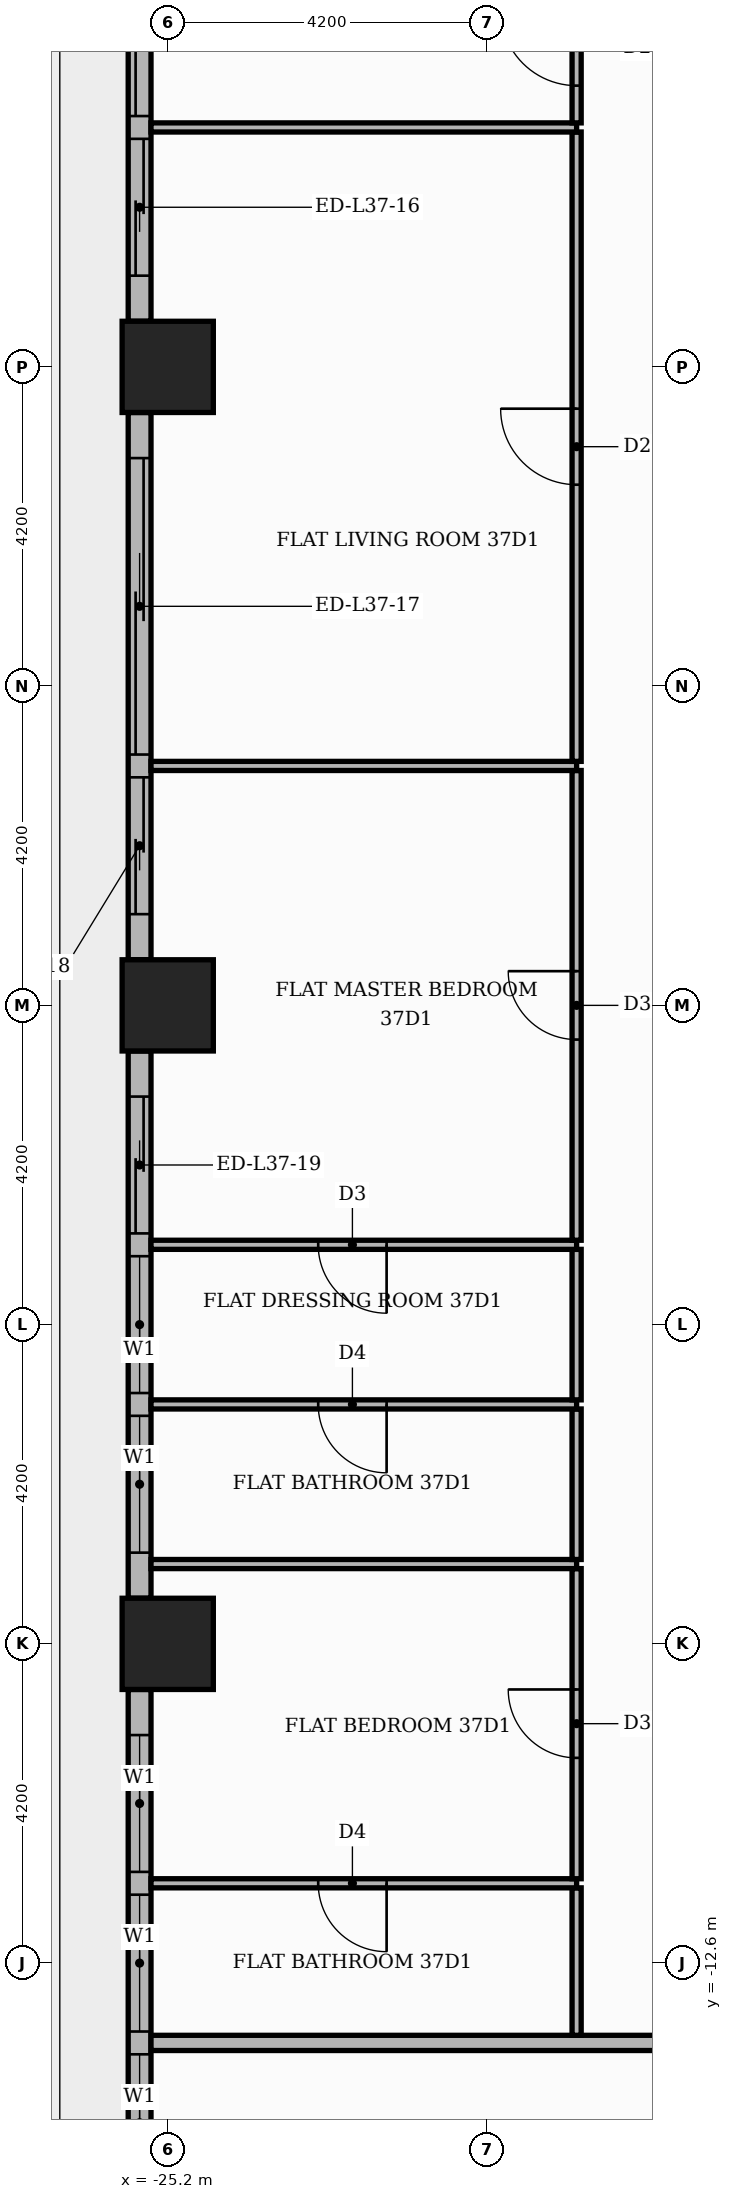
"""IFC4 building model, lengths in metres.
Left out: names, types, materials, properties, quantities, classifications, styles, units other than length and angle.
Written with IfcOpenShell. Run it as: python <this file> out.ifc"""

import sys

from ifc_helpers import new_model, si_unit, direction, frame, frame_2d, origin, origin_2d, place, context, subcontext, project, spatial, rectangle, extrude, element, fill, save


model = new_model("IFC4")
c1 = context("Model", 3, precision=1e-05, world=origin(), true_north=direction((0.0, 1.0)))
c2 = subcontext(c1, "Body", "Model", "MODEL_VIEW")
j1 = project(units=[si_unit("LENGTHUNIT", "METRE"), si_unit("PLANEANGLEUNIT", "RADIAN")], contexts=[c1])
p1 = place(None, origin())
s1 = spatial("IfcSite", under=j1, at=p1, CompositionType="ELEMENT")
p2 = place(p1, origin())
s2 = spatial("IfcBuilding", under=s1, at=p2, CompositionType="ELEMENT")
p3 = place(p2, frame((0.0, 0.0, 157.2)))
s3 = spatial("IfcBuildingStorey", under=s2, at=p3, CompositionType="ELEMENT", Elevation=157.2)
for number, where, z_axis, x_axis in (
    (1, (-25.2, 0.0, 0.0), (0.0, 0.0, 1.0), (1.0, 0.0, 0.0)),
    (2, (-25.2, -8.4, 0.0), (0.0, 0.0, 1.0), (1.0, 0.0, 0.0)),
    (3, (-25.2, 8.4, 0.0), (0.0, 0.0, 1.0), (1.0, 0.0, 0.0)),
):
    element("IfcColumn", number, at=place(p3, frame(where, z_axis=z_axis, x_axis=x_axis)), inside=s3, PredefinedType="COLUMN", context=c2, shape_type="SweptSolid", body=[
        extrude(rectangle(XDim=1.2, YDim=1.2, at=origin_2d()), origin(), (0.0, 0.0, 1.0), 3.9),
    ])
p4 = place(p3, frame((-25.57, 16.2, 0.0), z_axis=(0.0, 0.0, 1.0), x_axis=(0.0, -1.0, 0.0)))
e4 = element("IfcWall", 4, at=p4, inside=s3, PredefinedType="STANDARD", context=c2, shape_type="SweptSolid", body=[
    extrude(rectangle(XDim=7.2, YDim=0.3, at=frame_2d((3.6, 0.0))), origin(), (0.0, 0.0, 1.0), 3.48),
])
p5 = place(p4, frame((0.6, 0.0, 0.0)))
e5 = element("IfcOpeningElement", 5, at=p5, cuts=e4, PredefinedType="OPENING", context=c2, shape_type="SweptSolid", body=[
    extrude(rectangle(XDim=3.9, YDim=2.4, at=frame_2d((1.95, 1.2))), frame((0.0, 0.16, 0.0), z_axis=(0.0, -1.0, 0.0), x_axis=(1.0, 0.0, 0.0)), (0.0, 0.0, 1.0), 0.32),
])
p6 = place(p4, frame((4.8, 0.0, 0.0)))
e6 = element("IfcOpeningElement", 6, at=p6, cuts=e4, PredefinedType="OPENING", context=c2, shape_type="SweptSolid", body=[
    extrude(rectangle(XDim=1.8, YDim=2.4, at=frame_2d((0.9, 1.2))), frame((0.0, 0.16, 0.0), z_axis=(0.0, -1.0, 0.0), x_axis=(1.0, 0.0, 0.0)), (0.0, 0.0, 1.0), 0.32),
])
p7 = place(p3, frame((-25.57, 7.8, 0.0), z_axis=(0.0, 0.0, 1.0), x_axis=(0.0, -1.0, 0.0)))
e7 = element("IfcWall", 7, at=p7, inside=s3, PredefinedType="STANDARD", context=c2, shape_type="SweptSolid", body=[
    extrude(rectangle(XDim=7.2, YDim=0.3, at=frame_2d((3.6, 0.0))), origin(), (0.0, 0.0, 1.0), 3.48),
])
p8 = place(p7, frame((0.6, 0.0, 0.0)))
e8 = element("IfcOpeningElement", 8, at=p8, cuts=e7, PredefinedType="OPENING", context=c2, shape_type="SweptSolid", body=[
    extrude(rectangle(XDim=3.9, YDim=2.4, at=frame_2d((1.95, 1.2))), frame((0.0, 0.16, 0.0), z_axis=(0.0, -1.0, 0.0), x_axis=(1.0, 0.0, 0.0)), (0.0, 0.0, 1.0), 0.32),
])
p9 = place(p7, frame((4.8, 0.0, 0.0)))
e9 = element("IfcOpeningElement", 9, at=p9, cuts=e7, PredefinedType="OPENING", context=c2, shape_type="SweptSolid", body=[
    extrude(rectangle(XDim=1.8, YDim=2.4, at=frame_2d((0.9, 1.2))), frame((0.0, 0.16, 0.0), z_axis=(0.0, -1.0, 0.0), x_axis=(1.0, 0.0, 0.0)), (0.0, 0.0, 1.0), 0.32),
])
p10 = place(p3, frame((-25.57, -0.6, 0.0), z_axis=(0.0, 0.0, 1.0), x_axis=(0.0, -1.0, 0.0)))
e10 = element("IfcWall", 10, at=p10, inside=s3, PredefinedType="STANDARD", context=c2, shape_type="SweptSolid", body=[
    extrude(rectangle(XDim=7.2, YDim=0.3, at=frame_2d((3.6, 0.0))), origin(), (0.0, 0.0, 1.0), 3.48),
])
p11 = place(p10, frame((0.6, 0.0, 0.0)))
e11 = element("IfcOpeningElement", 11, at=p11, cuts=e10, PredefinedType="OPENING", context=c2, shape_type="SweptSolid", body=[
    extrude(rectangle(XDim=1.8, YDim=2.4, at=frame_2d((0.9, 1.2))), frame((0.0, 0.16, 0.0), z_axis=(0.0, -1.0, 0.0), x_axis=(1.0, 0.0, 0.0)), (0.0, 0.0, 1.0), 0.32),
])
p12 = place(p10, frame((2.7, 0.0, 0.9)))
e12 = element("IfcOpeningElement", 12, at=p12, cuts=e10, PredefinedType="OPENING", context=c2, shape_type="SweptSolid", body=[
    extrude(rectangle(XDim=1.8, YDim=2.1, at=frame_2d((0.9, 1.05))), frame((0.0, 0.16, 0.0), z_axis=(0.0, -1.0, 0.0), x_axis=(1.0, 0.0, 0.0)), (0.0, 0.0, 1.0), 0.32),
])
p13 = place(p10, frame((4.8, 0.0, 0.9)))
e13 = element("IfcOpeningElement", 13, at=p13, cuts=e10, PredefinedType="OPENING", context=c2, shape_type="SweptSolid", body=[
    extrude(rectangle(XDim=1.8, YDim=2.1, at=frame_2d((0.9, 1.05))), frame((0.0, 0.16, 0.0), z_axis=(0.0, -1.0, 0.0), x_axis=(1.0, 0.0, 0.0)), (0.0, 0.0, 1.0), 0.32),
])
p14 = place(p3, frame((-25.57, -9.0, 0.0), z_axis=(0.0, 0.0, 1.0), x_axis=(0.0, -1.0, 0.0)))
e14 = element("IfcWall", 14, at=p14, inside=s3, PredefinedType="STANDARD", context=c2, shape_type="SweptSolid", body=[
    extrude(rectangle(XDim=7.2, YDim=0.3, at=frame_2d((3.6, 0.0))), origin(), (0.0, 0.0, 1.0), 3.48),
])
p15 = place(p14, frame((0.6, 0.0, 0.9)))
e15 = element("IfcOpeningElement", 15, at=p15, cuts=e14, PredefinedType="OPENING", context=c2, shape_type="SweptSolid", body=[
    extrude(rectangle(XDim=1.8, YDim=2.1, at=frame_2d((0.9, 1.05))), frame((0.0, 0.16, 0.0), z_axis=(0.0, -1.0, 0.0), x_axis=(1.0, 0.0, 0.0)), (0.0, 0.0, 1.0), 0.32),
])
p16 = place(p14, frame((2.7, 0.0, 0.9)))
e16 = element("IfcOpeningElement", 16, at=p16, cuts=e14, PredefinedType="OPENING", context=c2, shape_type="SweptSolid", body=[
    extrude(rectangle(XDim=1.8, YDim=2.1, at=frame_2d((0.9, 1.05))), frame((0.0, 0.16, 0.0), z_axis=(0.0, -1.0, 0.0), x_axis=(1.0, 0.0, 0.0)), (0.0, 0.0, 1.0), 0.32),
])
p17 = place(p14, frame((4.8, 0.0, 0.9)))
e17 = element("IfcOpeningElement", 17, at=p17, cuts=e14, PredefinedType="OPENING", context=c2, shape_type="SweptSolid", body=[
    extrude(rectangle(XDim=1.8, YDim=2.1, at=frame_2d((0.9, 1.05))), frame((0.0, 0.16, 0.0), z_axis=(0.0, -1.0, 0.0), x_axis=(1.0, 0.0, 0.0)), (0.0, 0.0, 1.0), 0.32),
])
p18 = place(p3, frame((-25.42, -13.65, 0.0), z_axis=(0.0, 0.0, 1.0), x_axis=(1.0, 0.0, 0.0)))
e18 = element("IfcWall", 18, at=p18, inside=s3, PredefinedType="PARTITIONING", context=c2, shape_type="SweptSolid", body=[
    extrude(rectangle(XDim=39.07, YDim=0.2, at=frame_2d((19.535, 0.0))), origin(), (0.0, 0.0, 1.0), 3.48),
])
p19 = place(p18, frame((13.32, 0.0, 0.0)))
e19 = element("IfcOpeningElement", 19, at=p19, cuts=e18, PredefinedType="OPENING", context=c2, shape_type="SweptSolid", body=[
    extrude(rectangle(XDim=1.1, YDim=2.4, at=frame_2d((0.55, 1.2))), frame((0.0, 0.11, 0.0), z_axis=(0.0, -1.0, 0.0), x_axis=(1.0, 0.0, 0.0)), (0.0, 0.0, 1.0), 0.22),
])
p20 = place(p18, frame((21.72, 0.0, 0.0)))
e20 = element("IfcOpeningElement", 20, at=p20, cuts=e18, PredefinedType="OPENING", context=c2, shape_type="SweptSolid", body=[
    extrude(rectangle(XDim=1.1, YDim=2.4, at=frame_2d((0.55, 1.2))), frame((0.0, 0.11, 0.0), z_axis=(0.0, -1.0, 0.0), x_axis=(1.0, 0.0, 0.0)), (0.0, 0.0, 1.0), 0.22),
])
p21 = place(p3, frame((-19.82, -13.55, 0.0), z_axis=(0.0, 0.0, 1.0), x_axis=(0.0, 1.0, 0.0)))
e21 = element("IfcWall", 21, at=p21, inside=s3, PredefinedType="PARTITIONING", context=c2, shape_type="SweptSolid", body=[
    extrude(rectangle(XDim=1.94, YDim=0.12, at=frame_2d((0.97, 0.0))), origin(), (0.0, 0.0, 1.0), 3.48),
])
p22 = place(p3, frame((-25.42, -11.55, 0.0), z_axis=(0.0, 0.0, 1.0), x_axis=(1.0, 0.0, 0.0)))
e22 = element("IfcWall", 22, at=p22, inside=s3, PredefinedType="PARTITIONING", context=c2, shape_type="SweptSolid", body=[
    extrude(rectangle(XDim=5.6, YDim=0.12, at=frame_2d((2.8, 0.0))), origin(), (0.0, 0.0, 1.0), 3.48),
])
p23 = place(p22, frame((2.2, 0.0, 0.0)))
e23 = element("IfcOpeningElement", 23, at=p23, cuts=e22, PredefinedType="OPENING", context=c2, shape_type="SweptSolid", body=[
    extrude(rectangle(XDim=0.9, YDim=2.1, at=frame_2d((0.45, 1.05))), frame((0.0, 0.07, 0.0), z_axis=(0.0, -1.0, 0.0), x_axis=(1.0, 0.0, 0.0)), (0.0, 0.0, 1.0), 0.14),
])
p24 = place(p3, frame((-19.82, -11.49, 0.0), z_axis=(0.0, 0.0, 1.0), x_axis=(0.0, 1.0, 0.0)))
e24 = element("IfcWall", 24, at=p24, inside=s3, PredefinedType="PARTITIONING", context=c2, shape_type="SweptSolid", body=[
    extrude(rectangle(XDim=4.08, YDim=0.12, at=frame_2d((2.04, 0.0))), origin(), (0.0, 0.0, 1.0), 3.48),
])
p25 = place(p24, frame((1.59, 0.0, 0.0)))
e25 = element("IfcOpeningElement", 25, at=p25, cuts=e24, PredefinedType="OPENING", context=c2, shape_type="SweptSolid", body=[
    extrude(rectangle(XDim=0.9, YDim=2.1, at=frame_2d((0.45, 1.05))), frame((0.0, 0.07, 0.0), z_axis=(0.0, -1.0, 0.0), x_axis=(1.0, 0.0, 0.0)), (0.0, 0.0, 1.0), 0.14),
])
p26 = place(p3, frame((-25.42, -7.35, 0.0), z_axis=(0.0, 0.0, 1.0), x_axis=(1.0, 0.0, 0.0)))
e26 = element("IfcWall", 26, at=p26, inside=s3, PredefinedType="PARTITIONING", context=c2, shape_type="SweptSolid", body=[
    extrude(rectangle(XDim=5.6, YDim=0.12, at=frame_2d((2.8, 0.0))), origin(), (0.0, 0.0, 1.0), 3.48),
])
p27 = place(p3, frame((-19.82, -7.29, 0.0), z_axis=(0.0, 0.0, 1.0), x_axis=(0.0, 1.0, 0.0)))
e27 = element("IfcWall", 27, at=p27, inside=s3, PredefinedType="PARTITIONING", context=c2, shape_type="SweptSolid", body=[
    extrude(rectangle(XDim=1.98, YDim=0.12, at=frame_2d((0.99, 0.0))), origin(), (0.0, 0.0, 1.0), 3.48),
])
p28 = place(p3, frame((-25.42, -5.25, 0.0), z_axis=(0.0, 0.0, 1.0), x_axis=(1.0, 0.0, 0.0)))
e28 = element("IfcWall", 28, at=p28, inside=s3, PredefinedType="PARTITIONING", context=c2, shape_type="SweptSolid", body=[
    extrude(rectangle(XDim=5.6, YDim=0.12, at=frame_2d((2.8, 0.0))), origin(), (0.0, 0.0, 1.0), 3.48),
])
p29 = place(p28, frame((2.2, 0.0, 0.0)))
e29 = element("IfcOpeningElement", 29, at=p29, cuts=e28, PredefinedType="OPENING", context=c2, shape_type="SweptSolid", body=[
    extrude(rectangle(XDim=0.9, YDim=2.1, at=frame_2d((0.45, 1.05))), frame((0.0, 0.07, 0.0), z_axis=(0.0, -1.0, 0.0), x_axis=(1.0, 0.0, 0.0)), (0.0, 0.0, 1.0), 0.14),
])
p30 = place(p3, frame((-19.82, -5.19, 0.0), z_axis=(0.0, 0.0, 1.0), x_axis=(0.0, 1.0, 0.0)))
e30 = element("IfcWall", 30, at=p30, inside=s3, PredefinedType="PARTITIONING", context=c2, shape_type="SweptSolid", body=[
    extrude(rectangle(XDim=1.98, YDim=0.12, at=frame_2d((0.99, 0.0))), origin(), (0.0, 0.0, 1.0), 3.48),
])
p31 = place(p3, frame((-25.42, -3.15, 0.0), z_axis=(0.0, 0.0, 1.0), x_axis=(1.0, 0.0, 0.0)))
e31 = element("IfcWall", 31, at=p31, inside=s3, PredefinedType="PARTITIONING", context=c2, shape_type="SweptSolid", body=[
    extrude(rectangle(XDim=5.6, YDim=0.12, at=frame_2d((2.8, 0.0))), origin(), (0.0, 0.0, 1.0), 3.48),
])
p32 = place(p31, frame((2.2, 0.0, 0.0)))
e32 = element("IfcOpeningElement", 32, at=p32, cuts=e31, PredefinedType="OPENING", context=c2, shape_type="SweptSolid", body=[
    extrude(rectangle(XDim=0.9, YDim=2.1, at=frame_2d((0.45, 1.05))), frame((0.0, 0.07, 0.0), z_axis=(0.0, -1.0, 0.0), x_axis=(1.0, 0.0, 0.0)), (0.0, 0.0, 1.0), 0.14),
])
p33 = place(p3, frame((-19.82, -3.09, 0.0), z_axis=(0.0, 0.0, 1.0), x_axis=(0.0, 1.0, 0.0)))
e33 = element("IfcWall", 33, at=p33, inside=s3, PredefinedType="PARTITIONING", context=c2, shape_type="SweptSolid", body=[
    extrude(rectangle(XDim=6.18, YDim=0.12, at=frame_2d((3.09, 0.0))), origin(), (0.0, 0.0, 1.0), 3.48),
])
p34 = place(p33, frame((2.64, 0.0, 0.0)))
e34 = element("IfcOpeningElement", 34, at=p34, cuts=e33, PredefinedType="OPENING", context=c2, shape_type="SweptSolid", body=[
    extrude(rectangle(XDim=0.9, YDim=2.1, at=frame_2d((0.45, 1.05))), frame((0.0, 0.07, 0.0), z_axis=(0.0, -1.0, 0.0), x_axis=(1.0, 0.0, 0.0)), (0.0, 0.0, 1.0), 0.14),
])
p35 = place(p3, frame((-25.42, 3.15, 0.0), z_axis=(0.0, 0.0, 1.0), x_axis=(1.0, 0.0, 0.0)))
e35 = element("IfcWall", 35, at=p35, inside=s3, PredefinedType="PARTITIONING", context=c2, shape_type="SweptSolid", body=[
    extrude(rectangle(XDim=5.6, YDim=0.12, at=frame_2d((2.8, 0.0))), origin(), (0.0, 0.0, 1.0), 3.48),
])
p36 = place(p3, frame((-19.82, 3.21, 0.0), z_axis=(0.0, 0.0, 1.0), x_axis=(0.0, 1.0, 0.0)))
e36 = element("IfcWall", 36, at=p36, inside=s3, PredefinedType="PARTITIONING", context=c2, shape_type="SweptSolid", body=[
    extrude(rectangle(XDim=8.28, YDim=0.12, at=frame_2d((4.14, 0.0))), origin(), (0.0, 0.0, 1.0), 3.48),
])
p37 = place(p36, frame((3.64, 0.0, 0.0)))
e37 = element("IfcOpeningElement", 37, at=p37, cuts=e36, PredefinedType="OPENING", context=c2, shape_type="SweptSolid", body=[
    extrude(rectangle(XDim=1.0, YDim=2.1, at=frame_2d((0.5, 1.05))), frame((0.0, 0.07, 0.0), z_axis=(0.0, -1.0, 0.0), x_axis=(1.0, 0.0, 0.0)), (0.0, 0.0, 1.0), 0.14),
])
p38 = place(p3, frame((-25.42, 11.55, 0.0), z_axis=(0.0, 0.0, 1.0), x_axis=(1.0, 0.0, 0.0)))
e38 = element("IfcWall", 38, at=p38, inside=s3, PredefinedType="PARTITIONING", context=c2, shape_type="SweptSolid", body=[
    extrude(rectangle(XDim=5.6, YDim=0.12, at=frame_2d((2.8, 0.0))), origin(), (0.0, 0.0, 1.0), 3.48),
])
p39 = place(p3, frame((-19.82, 11.61, 0.0), z_axis=(0.0, 0.0, 1.0), x_axis=(0.0, 1.0, 0.0)))
e39 = element("IfcWall", 39, at=p39, inside=s3, PredefinedType="PARTITIONING", context=c2, shape_type="SweptSolid", body=[
    extrude(rectangle(XDim=1.98, YDim=0.12, at=frame_2d((0.99, 0.0))), origin(), (0.0, 0.0, 1.0), 3.48),
])
p40 = place(p39, frame((0.49, 0.0, 0.0)))
e40 = element("IfcOpeningElement", 40, at=p40, cuts=e39, PredefinedType="OPENING", context=c2, shape_type="SweptSolid", body=[
    extrude(rectangle(XDim=1.0, YDim=2.1, at=frame_2d((0.5, 1.05))), frame((0.0, 0.07, 0.0), z_axis=(0.0, -1.0, 0.0), x_axis=(1.0, 0.0, 0.0)), (0.0, 0.0, 1.0), 0.14),
])
p41 = place(p5, origin())
e41 = element("IfcDoor", 41, at=p41, inside=s3, OperationType="SLIDING_TO_LEFT", PredefinedType="DOOR", context=c2, shape_type="SweptSolid", body=[
    extrude(rectangle(XDim=3.9, YDim=2.4, at=frame_2d((1.95, 1.2))), frame((0.0, 0.025, 0.0), z_axis=(0.0, -1.0, 0.0), x_axis=(1.0, 0.0, 0.0)), (0.0, 0.0, 1.0), 0.05),
])
fill(e5, e41)
p42 = place(p6, origin())
e42 = element("IfcDoor", 42, at=p42, inside=s3, OperationType="SLIDING_TO_RIGHT", PredefinedType="DOOR", context=c2, shape_type="SweptSolid", body=[
    extrude(rectangle(XDim=1.8, YDim=2.4, at=frame_2d((0.9, 1.2))), frame((0.0, 0.025, 0.0), z_axis=(0.0, -1.0, 0.0), x_axis=(1.0, 0.0, 0.0)), (0.0, 0.0, 1.0), 0.05),
])
fill(e6, e42)
p43 = place(p8, origin())
e43 = element("IfcDoor", 43, at=p43, inside=s3, OperationType="SLIDING_TO_LEFT", PredefinedType="DOOR", context=c2, shape_type="SweptSolid", body=[
    extrude(rectangle(XDim=3.9, YDim=2.4, at=frame_2d((1.95, 1.2))), frame((0.0, 0.025, 0.0), z_axis=(0.0, -1.0, 0.0), x_axis=(1.0, 0.0, 0.0)), (0.0, 0.0, 1.0), 0.05),
])
fill(e8, e43)
p44 = place(p9, origin())
e44 = element("IfcDoor", 44, at=p44, inside=s3, OperationType="SLIDING_TO_RIGHT", PredefinedType="DOOR", context=c2, shape_type="SweptSolid", body=[
    extrude(rectangle(XDim=1.8, YDim=2.4, at=frame_2d((0.9, 1.2))), frame((0.0, 0.025, 0.0), z_axis=(0.0, -1.0, 0.0), x_axis=(1.0, 0.0, 0.0)), (0.0, 0.0, 1.0), 0.05),
])
fill(e9, e44)
p45 = place(p11, origin())
e45 = element("IfcDoor", 45, at=p45, inside=s3, OperationType="SLIDING_TO_LEFT", PredefinedType="DOOR", context=c2, shape_type="SweptSolid", body=[
    extrude(rectangle(XDim=1.8, YDim=2.4, at=frame_2d((0.9, 1.2))), frame((0.0, 0.025, 0.0), z_axis=(0.0, -1.0, 0.0), x_axis=(1.0, 0.0, 0.0)), (0.0, 0.0, 1.0), 0.05),
])
fill(e11, e45)
p46 = place(p12, origin())
e46 = element("IfcWindow", 46, at=p46, inside=s3, PartitioningType="SINGLE_PANEL", PredefinedType="WINDOW", context=c2, shape_type="SweptSolid", body=[
    extrude(rectangle(XDim=1.8, YDim=2.1, at=frame_2d((0.9, 1.05))), frame((0.0, 0.03, 0.0), z_axis=(0.0, -1.0, 0.0), x_axis=(1.0, 0.0, 0.0)), (0.0, 0.0, 1.0), 0.06),
])
fill(e12, e46)
p47 = place(p13, origin())
e47 = element("IfcWindow", 47, at=p47, inside=s3, PartitioningType="SINGLE_PANEL", PredefinedType="WINDOW", context=c2, shape_type="SweptSolid", body=[
    extrude(rectangle(XDim=1.8, YDim=2.1, at=frame_2d((0.9, 1.05))), frame((0.0, 0.03, 0.0), z_axis=(0.0, -1.0, 0.0), x_axis=(1.0, 0.0, 0.0)), (0.0, 0.0, 1.0), 0.06),
])
fill(e13, e47)
p48 = place(p15, origin())
e48 = element("IfcWindow", 48, at=p48, inside=s3, PartitioningType="SINGLE_PANEL", PredefinedType="WINDOW", context=c2, shape_type="SweptSolid", body=[
    extrude(rectangle(XDim=1.8, YDim=2.1, at=frame_2d((0.9, 1.05))), frame((0.0, 0.03, 0.0), z_axis=(0.0, -1.0, 0.0), x_axis=(1.0, 0.0, 0.0)), (0.0, 0.0, 1.0), 0.06),
])
fill(e15, e48)
p49 = place(p16, origin())
e49 = element("IfcWindow", 49, at=p49, inside=s3, PartitioningType="SINGLE_PANEL", PredefinedType="WINDOW", context=c2, shape_type="SweptSolid", body=[
    extrude(rectangle(XDim=1.8, YDim=2.1, at=frame_2d((0.9, 1.05))), frame((0.0, 0.03, 0.0), z_axis=(0.0, -1.0, 0.0), x_axis=(1.0, 0.0, 0.0)), (0.0, 0.0, 1.0), 0.06),
])
fill(e16, e49)
p50 = place(p17, origin())
e50 = element("IfcWindow", 50, at=p50, inside=s3, PartitioningType="SINGLE_PANEL", PredefinedType="WINDOW", context=c2, shape_type="SweptSolid", body=[
    extrude(rectangle(XDim=1.8, YDim=2.1, at=frame_2d((0.9, 1.05))), frame((0.0, 0.03, 0.0), z_axis=(0.0, -1.0, 0.0), x_axis=(1.0, 0.0, 0.0)), (0.0, 0.0, 1.0), 0.06),
])
fill(e17, e50)
p51 = place(p40, origin())
e51 = element("IfcDoor", 51, at=p51, inside=s3, OperationType="SINGLE_SWING_RIGHT", PredefinedType="DOOR", context=c2, shape_type="SweptSolid", body=[
    extrude(rectangle(XDim=1.0, YDim=2.1, at=frame_2d((0.5, 1.05))), frame((0.0, 0.025, 0.0), z_axis=(0.0, -1.0, 0.0), x_axis=(1.0, 0.0, 0.0)), (0.0, 0.0, 1.0), 0.05),
])
fill(e40, e51)
p52 = place(p37, origin())
e52 = element("IfcDoor", 52, at=p52, inside=s3, OperationType="SINGLE_SWING_RIGHT", PredefinedType="DOOR", context=c2, shape_type="SweptSolid", body=[
    extrude(rectangle(XDim=1.0, YDim=2.1, at=frame_2d((0.5, 1.05))), frame((0.0, 0.025, 0.0), z_axis=(0.0, -1.0, 0.0), x_axis=(1.0, 0.0, 0.0)), (0.0, 0.0, 1.0), 0.05),
])
fill(e37, e52)
p53 = place(p34, origin())
e53 = element("IfcDoor", 53, at=p53, inside=s3, OperationType="SINGLE_SWING_RIGHT", PredefinedType="DOOR", context=c2, shape_type="SweptSolid", body=[
    extrude(rectangle(XDim=0.9, YDim=2.1, at=frame_2d((0.45, 1.05))), frame((0.0, 0.025, 0.0), z_axis=(0.0, -1.0, 0.0), x_axis=(1.0, 0.0, 0.0)), (0.0, 0.0, 1.0), 0.05),
])
fill(e34, e53)
p54 = place(p32, frame((0.9, 0.0, 0.0), z_axis=(0.0, 0.0, 1.0), x_axis=(-1.0, 0.0, 0.0)))
e54 = element("IfcDoor", 54, at=p54, inside=s3, OperationType="SINGLE_SWING_RIGHT", PredefinedType="DOOR", context=c2, shape_type="SweptSolid", body=[
    extrude(rectangle(XDim=0.9, YDim=2.1, at=frame_2d((0.45, 1.05))), frame((0.0, 0.025, 0.0), z_axis=(0.0, -1.0, 0.0), x_axis=(1.0, 0.0, 0.0)), (0.0, 0.0, 1.0), 0.05),
])
fill(e32, e54)
p55 = place(p29, frame((0.9, 0.0, 0.0), z_axis=(0.0, 0.0, 1.0), x_axis=(-1.0, 0.0, 0.0)))
e55 = element("IfcDoor", 55, at=p55, inside=s3, OperationType="SINGLE_SWING_RIGHT", PredefinedType="DOOR", context=c2, shape_type="SweptSolid", body=[
    extrude(rectangle(XDim=0.9, YDim=2.1, at=frame_2d((0.45, 1.05))), frame((0.0, 0.025, 0.0), z_axis=(0.0, -1.0, 0.0), x_axis=(1.0, 0.0, 0.0)), (0.0, 0.0, 1.0), 0.05),
])
fill(e29, e55)
p56 = place(p25, origin())
e56 = element("IfcDoor", 56, at=p56, inside=s3, OperationType="SINGLE_SWING_RIGHT", PredefinedType="DOOR", context=c2, shape_type="SweptSolid", body=[
    extrude(rectangle(XDim=0.9, YDim=2.1, at=frame_2d((0.45, 1.05))), frame((0.0, 0.025, 0.0), z_axis=(0.0, -1.0, 0.0), x_axis=(1.0, 0.0, 0.0)), (0.0, 0.0, 1.0), 0.05),
])
fill(e25, e56)
p57 = place(p23, frame((0.9, 0.0, 0.0), z_axis=(0.0, 0.0, 1.0), x_axis=(-1.0, 0.0, 0.0)))
e57 = element("IfcDoor", 57, at=p57, inside=s3, OperationType="SINGLE_SWING_RIGHT", PredefinedType="DOOR", context=c2, shape_type="SweptSolid", body=[
    extrude(rectangle(XDim=0.9, YDim=2.1, at=frame_2d((0.45, 1.05))), frame((0.0, 0.025, 0.0), z_axis=(0.0, -1.0, 0.0), x_axis=(1.0, 0.0, 0.0)), (0.0, 0.0, 1.0), 0.05),
])
fill(e23, e57)
save(model, sys.argv[1])
